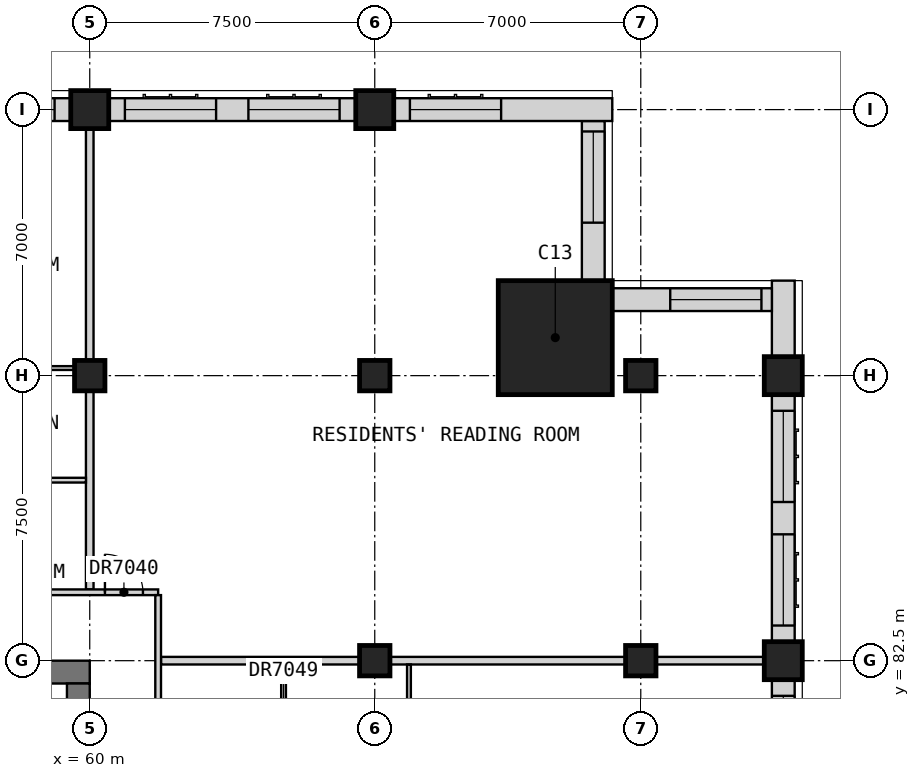
"""IFC4 building model, lengths in metres.
Left out: names, types, materials, properties, quantities, classifications, styles, units other than length and angle.
Written with IfcOpenShell. Run it as: python <this file> out.ifc"""

import sys

from ifc_helpers import new_model, si_unit, direction, frame, frame_2d, origin, origin_2d, place, context, subcontext, project, spatial, rectangle, extrude, element, fill, save


model = new_model("IFC4")
c1 = context("Model", 3, precision=1e-05, world=origin(), true_north=direction((0.0, 1.0)))
c2 = subcontext(c1, "Body", "Model", "MODEL_VIEW")
j1 = project(units=[si_unit("LENGTHUNIT", "METRE"), si_unit("PLANEANGLEUNIT", "RADIAN")], contexts=[c1])
p1 = place(None, origin())
s1 = spatial("IfcSite", under=j1, at=p1, CompositionType="ELEMENT")
p2 = place(p1, origin())
s2 = spatial("IfcBuilding", under=s1, at=p2, CompositionType="ELEMENT")
p3 = place(p2, frame((0.0, 0.0, 230.2)))
s3 = spatial("IfcBuildingStorey", under=s2, at=p3, CompositionType="ELEMENT", Elevation=230.2)
for number, where, z_axis, x_axis in (
    (1, (78.25, 82.5, 0.0), (0.0, 0.0, 1.0), (1.0, 0.0, 0.0)),
    (2, (78.25, 90.0, 0.0), (0.0, 0.0, 1.0), (1.0, 0.0, 0.0)),
):
    element("IfcColumn", number, at=place(p3, frame(where, z_axis=z_axis, x_axis=x_axis)), inside=s3, PredefinedType="COLUMN", context=c2, shape_type="SweptSolid", body=[
        extrude(rectangle(XDim=1.0, YDim=1.0, at=origin_2d()), origin(), (0.0, 0.0, 1.0), 3.5),
    ])
p4 = place(p3, frame((60.0, 90.0, 0.0), z_axis=(0.0, 0.0, 1.0), x_axis=(1.0, 0.0, 0.0)))
e3 = element("IfcColumn", 3, at=p4, inside=s3, PredefinedType="COLUMN", context=c2, shape_type="SweptSolid", body=[
    extrude(rectangle(XDim=0.8, YDim=0.8, at=origin_2d()), origin(), (0.0, 0.0, 1.0), 3.5),
])
p5 = place(p3, frame((60.0, 97.0, 0.0), z_axis=(0.0, 0.0, 1.0), x_axis=(1.0, 0.0, 0.0)))
e4 = element("IfcColumn", 4, at=p5, inside=s3, PredefinedType="COLUMN", context=c2, shape_type="SweptSolid", body=[
    extrude(rectangle(XDim=1.0, YDim=1.0, at=origin_2d()), origin(), (0.0, 0.0, 1.0), 3.5),
])
for number, where, z_axis, x_axis in (
    (5, (67.5, 82.5, 0.0), (0.0, 0.0, 1.0), (1.0, 0.0, 0.0)),
    (6, (67.5, 90.0, 0.0), (0.0, 0.0, 1.0), (1.0, 0.0, 0.0)),
):
    element("IfcColumn", number, at=place(p3, frame(where, z_axis=z_axis, x_axis=x_axis)), inside=s3, PredefinedType="COLUMN", context=c2, shape_type="SweptSolid", body=[
        extrude(rectangle(XDim=0.8, YDim=0.8, at=origin_2d()), origin(), (0.0, 0.0, 1.0), 3.5),
    ])
p6 = place(p3, frame((67.5, 97.0, 0.0), z_axis=(0.0, 0.0, 1.0), x_axis=(1.0, 0.0, 0.0)))
e7 = element("IfcColumn", 7, at=p6, inside=s3, PredefinedType="COLUMN", context=c2, shape_type="SweptSolid", body=[
    extrude(rectangle(XDim=1.0, YDim=1.0, at=origin_2d()), origin(), (0.0, 0.0, 1.0), 3.5),
])
for number, where, z_axis, x_axis in (
    (8, (74.5, 82.5, 0.0), (0.0, 0.0, 1.0), (1.0, 0.0, 0.0)),
    (9, (74.5, 90.0, 0.0), (0.0, 0.0, 1.0), (1.0, 0.0, 0.0)),
):
    element("IfcColumn", number, at=place(p3, frame(where, z_axis=z_axis, x_axis=x_axis)), inside=s3, PredefinedType="COLUMN", context=c2, shape_type="SweptSolid", body=[
        extrude(rectangle(XDim=0.8, YDim=0.8, at=origin_2d()), origin(), (0.0, 0.0, 1.0), 3.5),
    ])
p7 = place(p3, frame((72.25, 91.0, 0.0), z_axis=(0.0, 0.0, 1.0), x_axis=(1.0, 0.0, 0.0)))
e10 = element("IfcColumn", 10, at=p7, inside=s3, PredefinedType="COLUMN", context=c2, shape_type="SweptSolid", body=[
    extrude(rectangle(XDim=3.0, YDim=3.0, at=origin_2d()), origin(), (0.0, 0.0, 1.0), 3.5),
])
p8 = place(p3, frame((30.0, 82.2, 0.0), z_axis=(0.0, 0.0, 1.0), x_axis=(1.0, 0.0, 0.0)))
e11 = element("IfcWall", 11, at=p8, inside=s3, PredefinedType="SHEAR", context=c2, shape_type="SweptSolid", body=[
    extrude(rectangle(XDim=30.0, YDim=0.6, at=frame_2d((15.0, 0.0))), origin(), (0.0, 0.0, 1.0), 3.5),
])
p9 = place(p3, frame((59.7, 60.6, 0.0), z_axis=(0.0, 0.0, 1.0), x_axis=(0.0, 1.0, 0.0)))
e12 = element("IfcWall", 12, at=p9, inside=s3, PredefinedType="SHEAR", context=c2, shape_type="SweptSolid", body=[
    extrude(rectangle(XDim=21.3, YDim=0.6, at=frame_2d((10.65, 0.0))), origin(), (0.0, 0.0, 1.0), 3.5),
])
p10 = place(p9, frame((14.9, 0.0, 0.0)))
e13 = element("IfcOpeningElement", 13, at=p10, cuts=e12, PredefinedType="OPENING", context=c2, shape_type="SweptSolid", body=[
    extrude(rectangle(XDim=1.8, YDim=2.1, at=frame_2d((0.9, 1.05))), frame((0.0, 0.31, 0.0), z_axis=(0.0, -1.0, 0.0), x_axis=(1.0, 0.0, 0.0)), (0.0, 0.0, 1.0), 0.62),
])
p11 = place(p3, frame((78.25, 75.5, 0.0), z_axis=(0.0, 0.0, 1.0), x_axis=(0.0, 1.0, 0.0)))
e14 = element("IfcWall", 14, at=p11, inside=s3, PredefinedType="SOLIDWALL", context=c2, shape_type="SweptSolid", body=[
    extrude(rectangle(XDim=6.5, YDim=0.6, at=frame_2d((3.25, 0.0))), origin(), (0.0, 0.0, 1.0), 2.75),
])
p12 = place(p11, frame((0.425, 0.0, 0.8)))
e15 = element("IfcOpeningElement", 15, at=p12, cuts=e14, PredefinedType="OPENING", context=c2, shape_type="SweptSolid", body=[
    extrude(rectangle(XDim=2.4, YDim=1.8, at=frame_2d((1.2, 0.9))), frame((0.0, 0.31, 0.0), z_axis=(0.0, -1.0, 0.0), x_axis=(1.0, 0.0, 0.0)), (0.0, 0.0, 1.0), 0.62),
])
p13 = place(p11, frame((3.675, 0.0, 0.8)))
e16 = element("IfcOpeningElement", 16, at=p13, cuts=e14, PredefinedType="OPENING", context=c2, shape_type="SweptSolid", body=[
    extrude(rectangle(XDim=2.4, YDim=1.8, at=frame_2d((1.2, 0.9))), frame((0.0, 0.31, 0.0), z_axis=(0.0, -1.0, 0.0), x_axis=(1.0, 0.0, 0.0)), (0.0, 0.0, 1.0), 0.62),
])
p14 = place(p3, frame((78.25, 83.0, 0.0), z_axis=(0.0, 0.0, 1.0), x_axis=(0.0, 1.0, 0.0)))
e17 = element("IfcWall", 17, at=p14, inside=s3, PredefinedType="SOLIDWALL", context=c2, shape_type="SweptSolid", body=[
    extrude(rectangle(XDim=6.5, YDim=0.6, at=frame_2d((3.25, 0.0))), origin(), (0.0, 0.0, 1.0), 2.75),
])
p15 = place(p14, frame((0.425, 0.0, 0.8)))
e18 = element("IfcOpeningElement", 18, at=p15, cuts=e17, PredefinedType="OPENING", context=c2, shape_type="SweptSolid", body=[
    extrude(rectangle(XDim=2.4, YDim=1.8, at=frame_2d((1.2, 0.9))), frame((0.0, 0.31, 0.0), z_axis=(0.0, -1.0, 0.0), x_axis=(1.0, 0.0, 0.0)), (0.0, 0.0, 1.0), 0.62),
])
p16 = place(p14, frame((3.675, 0.0, 0.8)))
e19 = element("IfcOpeningElement", 19, at=p16, cuts=e17, PredefinedType="OPENING", context=c2, shape_type="SweptSolid", body=[
    extrude(rectangle(XDim=2.4, YDim=1.8, at=frame_2d((1.2, 0.9))), frame((0.0, 0.31, 0.0), z_axis=(0.0, -1.0, 0.0), x_axis=(1.0, 0.0, 0.0)), (0.0, 0.0, 1.0), 0.62),
])
p17 = place(p3, frame((78.25, 90.5, 0.0), z_axis=(0.0, 0.0, 1.0), x_axis=(0.0, 1.0, 0.0)))
e20 = element("IfcWall", 20, at=p17, inside=s3, PredefinedType="SOLIDWALL", context=c2, shape_type="SweptSolid", body=[
    extrude(rectangle(XDim=2.0, YDim=0.6, at=frame_2d((1.0, 0.0))), origin(), (0.0, 0.0, 1.0), 3.25),
])
p18 = place(p3, frame((77.95, 92.0, 0.0), z_axis=(0.0, 0.0, 1.0), x_axis=(-1.0, 0.0, 0.0)))
e21 = element("IfcWall", 21, at=p18, inside=s3, PredefinedType="SOLIDWALL", context=c2, shape_type="SweptSolid", body=[
    extrude(rectangle(XDim=4.2, YDim=0.6, at=frame_2d((2.1, 0.0))), origin(), (0.0, 0.0, 1.0), 3.25),
])
p19 = place(p18, frame((0.275, 0.0, 0.8)))
e22 = element("IfcOpeningElement", 22, at=p19, cuts=e21, PredefinedType="OPENING", context=c2, shape_type="SweptSolid", body=[
    extrude(rectangle(XDim=2.4, YDim=1.8, at=frame_2d((1.2, 0.9))), frame((0.0, 0.31, 0.0), z_axis=(0.0, -1.0, 0.0), x_axis=(1.0, 0.0, 0.0)), (0.0, 0.0, 1.0), 0.62),
])
p20 = place(p3, frame((73.25, 92.5, 0.0), z_axis=(0.0, 0.0, 1.0), x_axis=(0.0, 1.0, 0.0)))
e23 = element("IfcWall", 23, at=p20, inside=s3, PredefinedType="SOLIDWALL", context=c2, shape_type="SweptSolid", body=[
    extrude(rectangle(XDim=4.2, YDim=0.6, at=frame_2d((2.1, 0.0))), origin(), (0.0, 0.0, 1.0), 3.25),
])
p21 = place(p20, frame((1.525, 0.0, 0.8)))
e24 = element("IfcOpeningElement", 24, at=p21, cuts=e23, PredefinedType="OPENING", context=c2, shape_type="SweptSolid", body=[
    extrude(rectangle(XDim=2.4, YDim=1.8, at=frame_2d((1.2, 0.9))), frame((0.0, 0.31, 0.0), z_axis=(0.0, -1.0, 0.0), x_axis=(1.0, 0.0, 0.0)), (0.0, 0.0, 1.0), 0.62),
])
p22 = place(p3, frame((73.75, 97.0, 0.0), z_axis=(0.0, 0.0, 1.0), x_axis=(-1.0, 0.0, 0.0)))
e25 = element("IfcWall", 25, at=p22, inside=s3, PredefinedType="SOLIDWALL", context=c2, shape_type="SweptSolid", body=[
    extrude(rectangle(XDim=5.75, YDim=0.6, at=frame_2d((2.875, 0.0))), origin(), (0.0, 0.0, 1.0), 2.75),
])
p23 = place(p22, frame((2.925, 0.0, 0.8)))
e26 = element("IfcOpeningElement", 26, at=p23, cuts=e25, PredefinedType="OPENING", context=c2, shape_type="SweptSolid", body=[
    extrude(rectangle(XDim=2.4, YDim=1.8, at=frame_2d((1.2, 0.9))), frame((0.0, 0.31, 0.0), z_axis=(0.0, -1.0, 0.0), x_axis=(1.0, 0.0, 0.0)), (0.0, 0.0, 1.0), 0.62),
])
p24 = place(p3, frame((67.0, 97.0, 0.0), z_axis=(0.0, 0.0, 1.0), x_axis=(-1.0, 0.0, 0.0)))
e27 = element("IfcWall", 27, at=p24, inside=s3, PredefinedType="SOLIDWALL", context=c2, shape_type="SweptSolid", body=[
    extrude(rectangle(XDim=6.5, YDim=0.6, at=frame_2d((3.25, 0.0))), origin(), (0.0, 0.0, 1.0), 2.75),
])
p25 = place(p24, frame((3.675, 0.0, 0.8)))
e28 = element("IfcOpeningElement", 28, at=p25, cuts=e27, PredefinedType="OPENING", context=c2, shape_type="SweptSolid", body=[
    extrude(rectangle(XDim=2.4, YDim=1.8, at=frame_2d((1.2, 0.9))), frame((0.0, 0.31, 0.0), z_axis=(0.0, -1.0, 0.0), x_axis=(1.0, 0.0, 0.0)), (0.0, 0.0, 1.0), 0.62),
])
p26 = place(p24, frame((0.425, 0.0, 0.8)))
e29 = element("IfcOpeningElement", 29, at=p26, cuts=e27, PredefinedType="OPENING", context=c2, shape_type="SweptSolid", body=[
    extrude(rectangle(XDim=2.4, YDim=1.8, at=frame_2d((1.2, 0.9))), frame((0.0, 0.31, 0.0), z_axis=(0.0, -1.0, 0.0), x_axis=(1.0, 0.0, 0.0)), (0.0, 0.0, 1.0), 0.62),
])
p27 = place(p3, frame((59.5, 97.0, 0.0), z_axis=(0.0, 0.0, 1.0), x_axis=(-1.0, 0.0, 0.0)))
e30 = element("IfcWall", 30, at=p27, inside=s3, PredefinedType="SOLIDWALL", context=c2, shape_type="SweptSolid", body=[
    extrude(rectangle(XDim=6.5, YDim=0.6, at=frame_2d((3.25, 0.0))), origin(), (0.0, 0.0, 1.0), 2.75),
])
p28 = place(p27, frame((3.675, 0.0, 0.8)))
e31 = element("IfcOpeningElement", 31, at=p28, cuts=e30, PredefinedType="OPENING", context=c2, shape_type="SweptSolid", body=[
    extrude(rectangle(XDim=2.4, YDim=1.8, at=frame_2d((1.2, 0.9))), frame((0.0, 0.31, 0.0), z_axis=(0.0, -1.0, 0.0), x_axis=(1.0, 0.0, 0.0)), (0.0, 0.0, 1.0), 0.62),
])
p29 = place(p27, frame((0.425, 0.0, 0.8)))
e32 = element("IfcOpeningElement", 32, at=p29, cuts=e30, PredefinedType="OPENING", context=c2, shape_type="SweptSolid", body=[
    extrude(rectangle(XDim=2.4, YDim=1.8, at=frame_2d((1.2, 0.9))), frame((0.0, 0.31, 0.0), z_axis=(0.0, -1.0, 0.0), x_axis=(1.0, 0.0, 0.0)), (0.0, 0.0, 1.0), 0.62),
])
p30 = place(p3, frame((61.875, 82.5, 0.0), z_axis=(0.0, 0.0, 1.0), x_axis=(1.0, 0.0, 0.0)))
e33 = element("IfcWall", 33, at=p30, inside=s3, PredefinedType="PARTITIONING", context=c2, shape_type="SweptSolid", body=[
    extrude(rectangle(XDim=16.875, YDim=0.2, at=frame_2d((8.438, 0.0))), origin(), (0.0, 0.0, 1.0), 3.25),
])
p31 = place(p3, frame((60.0, 84.375, 0.0), z_axis=(0.0, 0.0, 1.0), x_axis=(0.0, 1.0, 0.0)))
e34 = element("IfcWall", 34, at=p31, inside=s3, PredefinedType="PARTITIONING", context=c2, shape_type="SweptSolid", body=[
    extrude(rectangle(XDim=13.125, YDim=0.2, at=frame_2d((6.562, 0.0))), origin(), (0.0, 0.0, 1.0), 3.25),
])
p32 = place(p3, frame((33.85, 84.3, 0.0), z_axis=(0.0, 0.0, 1.0), x_axis=(1.0, 0.0, 0.0)))
e35 = element("IfcWall", 35, at=p32, inside=s3, PredefinedType="PARTITIONING", context=c2, shape_type="SweptSolid", body=[
    extrude(rectangle(XDim=27.95, YDim=0.15, at=frame_2d((13.975, 0.0))), origin(), (0.0, 0.0, 1.0), 3.25),
])
p33 = place(p32, frame((1.325, 0.0, 0.0)))
e36 = element("IfcOpeningElement", 36, at=p33, cuts=e35, PredefinedType="OPENING", context=c2, shape_type="SweptSolid", body=[
    extrude(rectangle(XDim=0.9, YDim=2.1, at=frame_2d((0.45, 1.05))), frame((0.0, 0.085, 0.0), z_axis=(0.0, -1.0, 0.0), x_axis=(1.0, 0.0, 0.0)), (0.0, 0.0, 1.0), 0.17),
])
p34 = place(p32, frame((8.825, 0.0, 0.0)))
e37 = element("IfcOpeningElement", 37, at=p34, cuts=e35, PredefinedType="OPENING", context=c2, shape_type="SweptSolid", body=[
    extrude(rectangle(XDim=0.9, YDim=2.1, at=frame_2d((0.45, 1.05))), frame((0.0, 0.085, 0.0), z_axis=(0.0, -1.0, 0.0), x_axis=(1.0, 0.0, 0.0)), (0.0, 0.0, 1.0), 0.17),
])
p35 = place(p32, frame((20.075, 0.0, 0.0)))
e38 = element("IfcOpeningElement", 38, at=p35, cuts=e35, PredefinedType="OPENING", context=c2, shape_type="SweptSolid", body=[
    extrude(rectangle(XDim=0.9, YDim=2.1, at=frame_2d((0.45, 1.05))), frame((0.0, 0.085, 0.0), z_axis=(0.0, -1.0, 0.0), x_axis=(1.0, 0.0, 0.0)), (0.0, 0.0, 1.0), 0.17),
])
p36 = place(p32, frame((26.55, 0.0, 0.0)))
e39 = element("IfcOpeningElement", 39, at=p36, cuts=e35, PredefinedType="OPENING", context=c2, shape_type="SweptSolid", body=[
    extrude(rectangle(XDim=1.0, YDim=2.1, at=frame_2d((0.5, 1.05))), frame((0.0, 0.085, 0.0), z_axis=(0.0, -1.0, 0.0), x_axis=(1.0, 0.0, 0.0)), (0.0, 0.0, 1.0), 0.17),
])
p37 = place(p3, frame((61.8, 58.275, 0.0), z_axis=(0.0, 0.0, 1.0), x_axis=(0.0, 1.0, 0.0)))
e40 = element("IfcWall", 40, at=p37, inside=s3, PredefinedType="PARTITIONING", context=c2, shape_type="SweptSolid", body=[
    extrude(rectangle(XDim=25.95, YDim=0.15, at=frame_2d((12.975, 0.0))), origin(), (0.0, 0.0, 1.0), 3.25),
])
p38 = place(p37, frame((4.575, 0.0, 0.0)))
e41 = element("IfcOpeningElement", 41, at=p38, cuts=e40, PredefinedType="OPENING", context=c2, shape_type="SweptSolid", body=[
    extrude(rectangle(XDim=1.8, YDim=2.1, at=frame_2d((0.9, 1.05))), frame((0.0, 0.085, 0.0), z_axis=(0.0, -1.0, 0.0), x_axis=(1.0, 0.0, 0.0)), (0.0, 0.0, 1.0), 0.17),
])
p39 = place(p37, frame((14.4, 0.0, 0.0)))
e42 = element("IfcOpeningElement", 42, at=p39, cuts=e40, PredefinedType="OPENING", context=c2, shape_type="SweptSolid", body=[
    extrude(rectangle(XDim=0.9, YDim=2.1, at=frame_2d((0.45, 1.05))), frame((0.0, 0.085, 0.0), z_axis=(0.0, -1.0, 0.0), x_axis=(1.0, 0.0, 0.0)), (0.0, 0.0, 1.0), 0.17),
])
p40 = place(p3, frame((33.85, 90.2, 0.0), z_axis=(0.0, 0.0, 1.0), x_axis=(1.0, 0.0, 0.0)))
e43 = element("IfcWall", 43, at=p40, inside=s3, PredefinedType="PARTITIONING", context=c2, shape_type="SweptSolid", body=[
    extrude(rectangle(XDim=26.05, YDim=0.1, at=frame_2d((13.025, 0.0))), origin(), (0.0, 0.0, 1.0), 3.25),
])
p41 = place(p40, frame((0.175, 0.0, 0.0)))
e44 = element("IfcOpeningElement", 44, at=p41, cuts=e43, PredefinedType="OPENING", context=c2, shape_type="SweptSolid", body=[
    extrude(rectangle(XDim=0.9, YDim=2.1, at=frame_2d((0.45, 1.05))), frame((0.0, 0.06, 0.0), z_axis=(0.0, -1.0, 0.0), x_axis=(1.0, 0.0, 0.0)), (0.0, 0.0, 1.0), 0.12),
])
p42 = place(p40, frame((8.825, 0.0, 0.0)))
e45 = element("IfcOpeningElement", 45, at=p42, cuts=e43, PredefinedType="OPENING", context=c2, shape_type="SweptSolid", body=[
    extrude(rectangle(XDim=0.9, YDim=2.1, at=frame_2d((0.45, 1.05))), frame((0.0, 0.06, 0.0), z_axis=(0.0, -1.0, 0.0), x_axis=(1.0, 0.0, 0.0)), (0.0, 0.0, 1.0), 0.12),
])
p43 = place(p40, frame((16.325, 0.0, 0.0)))
e46 = element("IfcOpeningElement", 46, at=p43, cuts=e43, PredefinedType="OPENING", context=c2, shape_type="SweptSolid", body=[
    extrude(rectangle(XDim=0.9, YDim=2.1, at=frame_2d((0.45, 1.05))), frame((0.0, 0.06, 0.0), z_axis=(0.0, -1.0, 0.0), x_axis=(1.0, 0.0, 0.0)), (0.0, 0.0, 1.0), 0.12),
])
p44 = place(p40, frame((20.075, 0.0, 0.0)))
e47 = element("IfcOpeningElement", 47, at=p44, cuts=e43, PredefinedType="OPENING", context=c2, shape_type="SweptSolid", body=[
    extrude(rectangle(XDim=0.9, YDim=2.1, at=frame_2d((0.45, 1.05))), frame((0.0, 0.06, 0.0), z_axis=(0.0, -1.0, 0.0), x_axis=(1.0, 0.0, 0.0)), (0.0, 0.0, 1.0), 0.12),
])
p45 = place(p3, frame((68.4, 67.6, 0.0), z_axis=(0.0, 0.0, 1.0), x_axis=(0.0, 1.0, 0.0)))
e48 = element("IfcWall", 48, at=p45, inside=s3, PredefinedType="PARTITIONING", context=c2, shape_type="SweptSolid", body=[
    extrude(rectangle(XDim=14.8, YDim=0.1, at=frame_2d((7.4, 0.0))), origin(), (0.0, 0.0, 1.0), 3.25),
])
p46 = place(p45, frame((1.325, 0.0, 0.0)))
e49 = element("IfcOpeningElement", 49, at=p46, cuts=e48, PredefinedType="OPENING", context=c2, shape_type="SweptSolid", body=[
    extrude(rectangle(XDim=0.9, YDim=2.1, at=frame_2d((0.45, 1.05))), frame((0.0, 0.06, 0.0), z_axis=(0.0, -1.0, 0.0), x_axis=(1.0, 0.0, 0.0)), (0.0, 0.0, 1.0), 0.12),
])
p47 = place(p45, frame((5.075, 0.0, 0.0)))
e50 = element("IfcOpeningElement", 50, at=p47, cuts=e48, PredefinedType="OPENING", context=c2, shape_type="SweptSolid", body=[
    extrude(rectangle(XDim=0.9, YDim=2.1, at=frame_2d((0.45, 1.05))), frame((0.0, 0.06, 0.0), z_axis=(0.0, -1.0, 0.0), x_axis=(1.0, 0.0, 0.0)), (0.0, 0.0, 1.0), 0.12),
])
p48 = place(p45, frame((12.575, 0.0, 0.0)))
e51 = element("IfcOpeningElement", 51, at=p48, cuts=e48, PredefinedType="OPENING", context=c2, shape_type="SweptSolid", body=[
    extrude(rectangle(XDim=0.9, YDim=2.1, at=frame_2d((0.45, 1.05))), frame((0.0, 0.06, 0.0), z_axis=(0.0, -1.0, 0.0), x_axis=(1.0, 0.0, 0.0)), (0.0, 0.0, 1.0), 0.12),
])
p49 = place(p3, frame((56.25, 87.25, 0.0), z_axis=(0.0, 0.0, 1.0), x_axis=(1.0, 0.0, 0.0)))
e52 = element("IfcWall", 52, at=p49, inside=s3, PredefinedType="PARTITIONING", context=c2, shape_type="SweptSolid", body=[
    extrude(rectangle(XDim=3.65, YDim=0.125, at=frame_2d((1.825, 0.0))), origin(), (0.0, 0.0, 1.0), 3.25),
])
p50 = place(p3, frame((65.1, 75.062, 0.0), z_axis=(0.0, 0.0, 1.0), x_axis=(0.0, 1.0, 0.0)))
e53 = element("IfcWall", 53, at=p50, inside=s3, PredefinedType="PARTITIONING", context=c2, shape_type="SweptSolid", body=[
    extrude(rectangle(XDim=7.337, YDim=0.125, at=frame_2d((3.669, 0.0))), origin(), (0.0, 0.0, 1.0), 3.25),
])
p51 = place(p50, frame((5.113, 0.0, 0.0)))
e54 = element("IfcOpeningElement", 54, at=p51, cuts=e53, PredefinedType="OPENING", context=c2, shape_type="SweptSolid", body=[
    extrude(rectangle(XDim=0.9, YDim=2.1, at=frame_2d((0.45, 1.05))), frame((0.0, 0.073, 0.0), z_axis=(0.0, -1.0, 0.0), x_axis=(1.0, 0.0, 0.0)), (0.0, 0.0, 1.0), 0.145),
])
p52 = place(p13, origin())
e55 = element("IfcWindow", 55, at=p52, inside=s3, PartitioningType="SINGLE_PANEL", PredefinedType="WINDOW", context=c2, shape_type="SweptSolid", body=[
    extrude(rectangle(XDim=2.4, YDim=1.8, at=frame_2d((1.2, 0.9))), frame((0.0, -0.07, 0.0), z_axis=(0.0, -1.0, 0.0), x_axis=(1.0, 0.0, 0.0)), (0.0, 0.0, 1.0), 0.06),
])
fill(e16, e55)
p53 = place(p15, origin())
e56 = element("IfcWindow", 56, at=p53, inside=s3, PartitioningType="SINGLE_PANEL", PredefinedType="WINDOW", context=c2, shape_type="SweptSolid", body=[
    extrude(rectangle(XDim=2.4, YDim=1.8, at=frame_2d((1.2, 0.9))), frame((0.0, -0.07, 0.0), z_axis=(0.0, -1.0, 0.0), x_axis=(1.0, 0.0, 0.0)), (0.0, 0.0, 1.0), 0.06),
])
fill(e18, e56)
p54 = place(p16, origin())
e57 = element("IfcWindow", 57, at=p54, inside=s3, PartitioningType="SINGLE_PANEL", PredefinedType="WINDOW", context=c2, shape_type="SweptSolid", body=[
    extrude(rectangle(XDim=2.4, YDim=1.8, at=frame_2d((1.2, 0.9))), frame((0.0, -0.07, 0.0), z_axis=(0.0, -1.0, 0.0), x_axis=(1.0, 0.0, 0.0)), (0.0, 0.0, 1.0), 0.06),
])
fill(e19, e57)
p55 = place(p19, origin())
e58 = element("IfcWindow", 58, at=p55, inside=s3, PartitioningType="SINGLE_PANEL", PredefinedType="WINDOW", context=c2, shape_type="SweptSolid", body=[
    extrude(rectangle(XDim=2.4, YDim=1.8, at=frame_2d((1.2, 0.9))), frame((0.0, -0.07, 0.0), z_axis=(0.0, -1.0, 0.0), x_axis=(1.0, 0.0, 0.0)), (0.0, 0.0, 1.0), 0.06),
])
fill(e22, e58)
p56 = place(p21, origin())
e59 = element("IfcWindow", 59, at=p56, inside=s3, PartitioningType="SINGLE_PANEL", PredefinedType="WINDOW", context=c2, shape_type="SweptSolid", body=[
    extrude(rectangle(XDim=2.4, YDim=1.8, at=frame_2d((1.2, 0.9))), frame((0.0, -0.07, 0.0), z_axis=(0.0, -1.0, 0.0), x_axis=(1.0, 0.0, 0.0)), (0.0, 0.0, 1.0), 0.06),
])
fill(e24, e59)
p57 = place(p23, origin())
e60 = element("IfcWindow", 60, at=p57, inside=s3, PartitioningType="SINGLE_PANEL", PredefinedType="WINDOW", context=c2, shape_type="SweptSolid", body=[
    extrude(rectangle(XDim=2.4, YDim=1.8, at=frame_2d((1.2, 0.9))), frame((0.0, -0.07, 0.0), z_axis=(0.0, -1.0, 0.0), x_axis=(1.0, 0.0, 0.0)), (0.0, 0.0, 1.0), 0.06),
])
fill(e26, e60)
p58 = place(p25, origin())
e61 = element("IfcWindow", 61, at=p58, inside=s3, PartitioningType="SINGLE_PANEL", PredefinedType="WINDOW", context=c2, shape_type="SweptSolid", body=[
    extrude(rectangle(XDim=2.4, YDim=1.8, at=frame_2d((1.2, 0.9))), frame((0.0, -0.07, 0.0), z_axis=(0.0, -1.0, 0.0), x_axis=(1.0, 0.0, 0.0)), (0.0, 0.0, 1.0), 0.06),
])
fill(e28, e61)
p59 = place(p26, origin())
e62 = element("IfcWindow", 62, at=p59, inside=s3, PartitioningType="SINGLE_PANEL", PredefinedType="WINDOW", context=c2, shape_type="SweptSolid", body=[
    extrude(rectangle(XDim=2.4, YDim=1.8, at=frame_2d((1.2, 0.9))), frame((0.0, -0.07, 0.0), z_axis=(0.0, -1.0, 0.0), x_axis=(1.0, 0.0, 0.0)), (0.0, 0.0, 1.0), 0.06),
])
fill(e29, e62)
p60 = place(p29, origin())
e63 = element("IfcWindow", 63, at=p60, inside=s3, PartitioningType="SINGLE_PANEL", PredefinedType="WINDOW", context=c2, shape_type="SweptSolid", body=[
    extrude(rectangle(XDim=2.4, YDim=1.8, at=frame_2d((1.2, 0.9))), frame((0.0, -0.07, 0.0), z_axis=(0.0, -1.0, 0.0), x_axis=(1.0, 0.0, 0.0)), (0.0, 0.0, 1.0), 0.06),
])
fill(e32, e63)
p61 = place(p36, origin())
e64 = element("IfcDoor", 64, at=p61, inside=s3, OperationType="SINGLE_SWING_LEFT", PredefinedType="DOOR", context=c2, shape_type="SweptSolid", body=[
    extrude(rectangle(XDim=1.0, YDim=2.1, at=frame_2d((0.5, 1.05))), frame((0.0, 0.025, 0.0), z_axis=(0.0, -1.0, 0.0), x_axis=(1.0, 0.0, 0.0)), (0.0, 0.0, 1.0), 0.05),
])
fill(e39, e64)
save(model, sys.argv[1])
